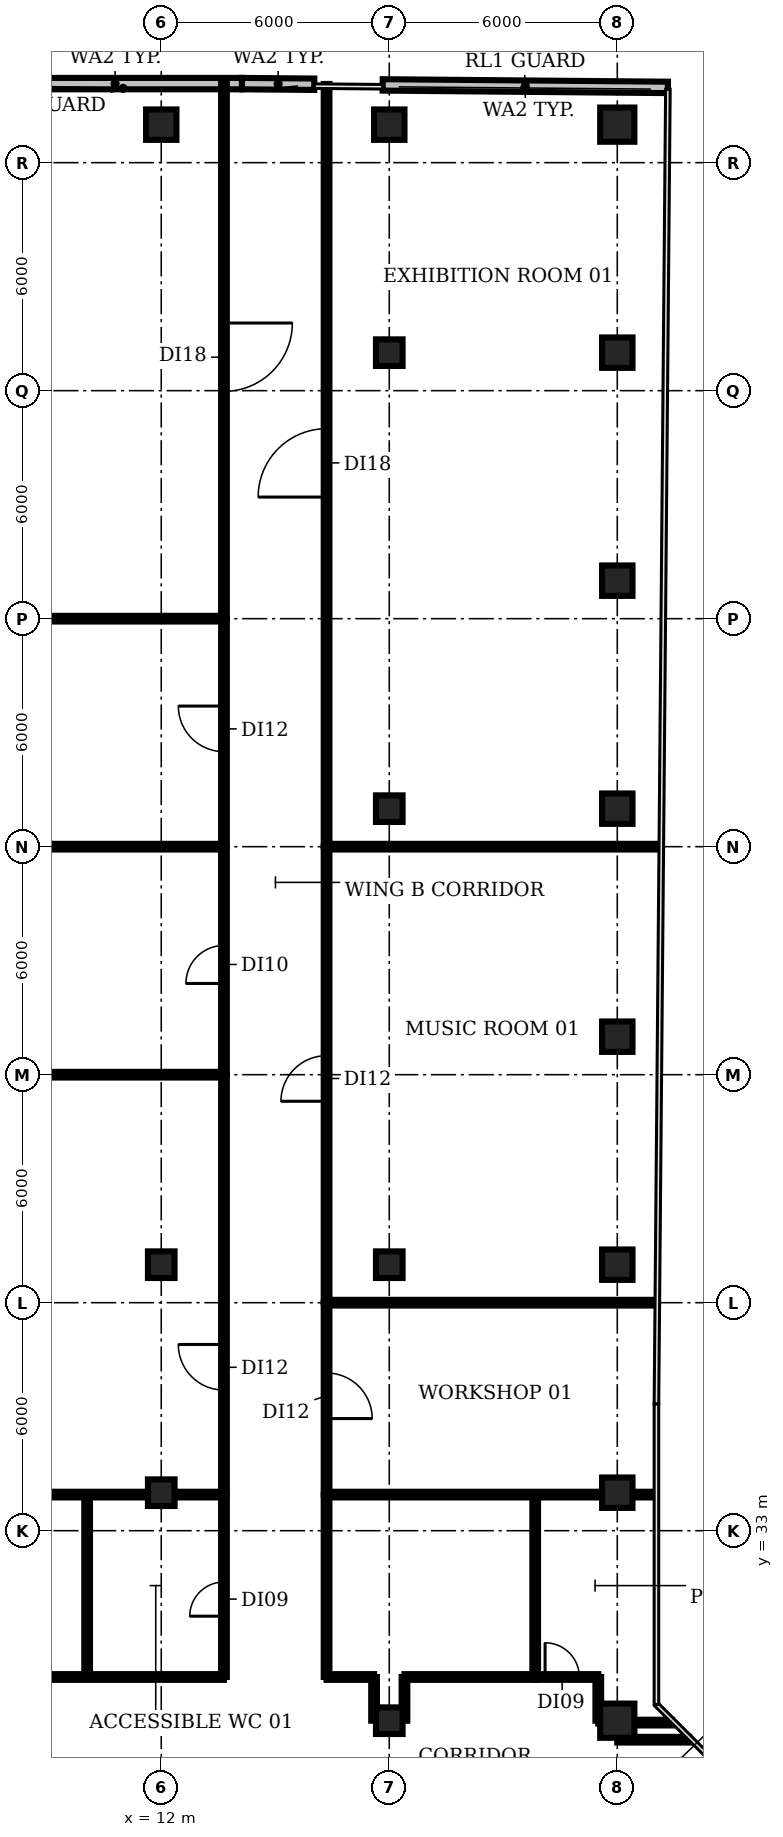
"""IFC4 building model, lengths in metres.
Left out: names, types, materials, properties, quantities, classifications, styles, units other than length and angle.
Written with IfcOpenShell. Run it as: python <this file> out.ifc"""

import sys

from ifc_helpers import new_model, si_unit, direction, frame, frame_2d, origin, origin_2d, place, context, subcontext, project, spatial, rectangle, circle, extrude, element, fill, save


model = new_model("IFC4")
c1 = context("Model", 3, precision=1e-05, world=origin(), true_north=direction((0.0, 1.0)))
c2 = subcontext(c1, "Body", "Model", "MODEL_VIEW")
j1 = project(units=[si_unit("LENGTHUNIT", "METRE"), si_unit("PLANEANGLEUNIT", "RADIAN")], contexts=[c1])
p1 = place(None, origin())
s1 = spatial("IfcSite", under=j1, at=p1, CompositionType="ELEMENT")
p2 = place(p1, origin())
s2 = spatial("IfcBuilding", under=s1, at=p2, CompositionType="ELEMENT")
p3 = place(p2, frame((0.0, 0.0, 230.6)))
s3 = spatial("IfcBuildingStorey", under=s2, at=p3, CompositionType="ELEMENT", Elevation=230.6)
for number, where, z_axis, x_axis in (
    (1, (12.0, 34.0, 0.0), (0.0, 0.0, 1.0), (1.0, 0.0, 0.0)),
    (2, (12.0, 40.0, 0.0), (0.0, 0.0, 1.0), (1.0, 0.0, 0.0)),
):
    element("IfcColumn", number, at=place(p3, frame(where, z_axis=z_axis, x_axis=x_axis)), inside=s3, PredefinedType="COLUMN", context=c2, shape_type="SweptSolid", body=[
        extrude(rectangle(XDim=0.7, YDim=0.7, at=origin_2d()), origin(), (0.0, 0.0, 1.0), 3.85),
    ])
p4 = place(p3, frame((12.0, 70.0, 0.0), z_axis=(0.0, 0.0, 1.0), x_axis=(1.0, 0.0, 0.0)))
e3 = element("IfcColumn", 3, at=p4, inside=s3, PredefinedType="COLUMN", context=c2, shape_type="SweptSolid", body=[
    extrude(rectangle(XDim=0.8, YDim=0.8, at=origin_2d()), origin(), (0.0, 0.0, 1.0), 3.85),
])
for number, where, z_axis, x_axis in (
    (4, (18.0, 28.0, 0.0), (0.0, 0.0, 1.0), (1.0, 0.0, 0.0)),
    (5, (18.0, 40.0, 0.0), (0.0, 0.0, 1.0), (1.0, 0.0, 0.0)),
    (6, (18.0, 52.0, 0.0), (0.0, 0.0, 1.0), (1.0, 0.0, 0.0)),
    (7, (18.0, 64.0, 0.0), (0.0, 0.0, 1.0), (1.0, 0.0, 0.0)),
):
    element("IfcColumn", number, at=place(p3, frame(where, z_axis=z_axis, x_axis=x_axis)), inside=s3, PredefinedType="COLUMN", context=c2, shape_type="SweptSolid", body=[
        extrude(rectangle(XDim=0.7, YDim=0.7, at=origin_2d()), origin(), (0.0, 0.0, 1.0), 3.85),
    ])
p5 = place(p3, frame((18.0, 70.0, 0.0), z_axis=(0.0, 0.0, 1.0), x_axis=(1.0, 0.0, 0.0)))
e8 = element("IfcColumn", 8, at=p5, inside=s3, PredefinedType="COLUMN", context=c2, shape_type="SweptSolid", body=[
    extrude(rectangle(XDim=0.8, YDim=0.8, at=origin_2d()), origin(), (0.0, 0.0, 1.0), 3.85),
])
p6 = place(p3, frame((24.0, 28.0, 0.0), z_axis=(0.0, 0.0, 1.0), x_axis=(1.0, 0.0, 0.0)))
e9 = element("IfcColumn", 9, at=p6, inside=s3, PredefinedType="COLUMN", context=c2, shape_type="SweptSolid", body=[
    extrude(circle(Radius=0.45, at=origin_2d()), origin(), (0.0, 0.0, 1.0), 3.85),
])
for number, where, z_axis, x_axis in (
    (10, (24.0, 34.0, 0.0), (0.0, 0.0, 1.0), (1.0, 0.0, 0.0)),
    (11, (24.0, 40.0, 0.0), (0.0, 0.0, 1.0), (1.0, 0.0, 0.0)),
    (12, (24.0, 46.0, 0.0), (0.0, 0.0, 1.0), (1.0, 0.0, 0.0)),
    (13, (24.0, 52.0, 0.0), (0.0, 0.0, 1.0), (1.0, 0.0, 0.0)),
    (14, (24.0, 58.0, 0.0), (0.0, 0.0, 1.0), (1.0, 0.0, 0.0)),
    (15, (24.0, 64.0, 0.0), (0.0, 0.0, 1.0), (1.0, 0.0, 0.0)),
):
    element("IfcColumn", number, at=place(p3, frame(where, z_axis=z_axis, x_axis=x_axis)), inside=s3, PredefinedType="COLUMN", context=c2, shape_type="SweptSolid", body=[
        extrude(rectangle(XDim=0.8, YDim=0.8, at=origin_2d()), origin(), (0.0, 0.0, 1.0), 3.85),
    ])
p7 = place(p3, frame((24.0, 70.0, 0.0), z_axis=(0.0, 0.0, 1.0), x_axis=(1.0, 0.0, 0.0)))
e16 = element("IfcColumn", 16, at=p7, inside=s3, PredefinedType="COLUMN", context=c2, shape_type="SweptSolid", body=[
    extrude(circle(Radius=0.45, at=origin_2d()), origin(), (0.0, 0.0, 1.0), 3.85),
])
p8 = place(p3, frame((14.124, 71.08, 0.0), z_axis=(0.0, 0.0, 1.0), x_axis=(-1.0, 0.0, 0.0)))
e17 = element("IfcWall", 17, at=p8, inside=s3, PredefinedType="SOLIDWALL", context=c2, shape_type="SweptSolid", body=[
    extrude(rectangle(XDim=6.677, YDim=0.3, at=frame_2d((3.339, 0.0))), origin(), (0.0, 0.0, 1.0), 3.85),
])
p9 = place(p3, frame((25.332, 70.98, 0.0), z_axis=(0.0, 0.0, 1.0), x_axis=(-0.999961723794, 0.008749339829, 0.0)))
e18 = element("IfcWall", 18, at=p9, inside=s3, PredefinedType="SOLIDWALL", context=c2, shape_type="SweptSolid", body=[
    extrude(rectangle(XDim=7.506, YDim=0.3, at=frame_2d((3.753, 0.0))), origin(), (0.0, 0.0, 1.0), 3.85),
])
p10 = place(p3, frame((16.027, 71.063, 0.0), z_axis=(0.0, 0.0, 1.0), x_axis=(-0.999961913014, 0.008727687086, 0.0)))
e19 = element("IfcWall", 19, at=p10, inside=s3, PredefinedType="SOLIDWALL", context=c2, shape_type="SweptSolid", body=[
    extrude(rectangle(XDim=1.902, YDim=0.3, at=frame_2d((0.951, 0.0))), origin(), (0.0, 0.0, 1.0), 3.85),
])
p11 = place(p3, frame((-1.0, 33.95, 0.0), z_axis=(0.0, 0.0, 1.0), x_axis=(1.0, 0.0, 0.0)))
e20 = element("IfcWall", 20, at=p11, inside=s3, PredefinedType="PARTITIONING", context=c2, shape_type="SweptSolid", body=[
    extrude(rectangle(XDim=14.65, YDim=0.15, at=frame_2d((7.325, 0.0))), origin(), (0.0, 0.0, 1.0), 2.88),
])
for number, where, z_axis, x_axis in (
    (21, (-0.98, 45.0, 0.0), (0.0, 0.0, 1.0), (1.0, 0.0, 0.0)),
    (22, (-0.98, 51.0, 0.0), (0.0, 0.0, 1.0), (1.0, 0.0, 0.0)),
    (23, (-0.98, 57.0, 0.0), (0.0, 0.0, 1.0), (1.0, 0.0, 0.0)),
):
    element("IfcWall", number, at=place(p3, frame(where, z_axis=z_axis, x_axis=x_axis)), inside=s3, PredefinedType="PARTITIONING", context=c2, shape_type="SweptSolid", body=[
        extrude(rectangle(XDim=14.63, YDim=0.15, at=frame_2d((7.315, 0.0))), origin(), (0.0, 0.0, 1.0), 2.88),
    ])
p12 = place(p3, frame((6.4, 29.15, 0.0), z_axis=(0.0, 0.0, 1.0), x_axis=(1.0, 0.0, 0.0)))
e24 = element("IfcWall", 24, at=p12, inside=s3, PredefinedType="PARTITIONING", context=c2, shape_type="SweptSolid", body=[
    extrude(rectangle(XDim=7.25, YDim=0.15, at=frame_2d((3.625, 0.0))), origin(), (0.0, 0.0, 1.0), 2.88),
])
p13 = place(p3, frame((10.05, 29.15, 0.0), z_axis=(0.0, 0.0, 1.0), x_axis=(0.0, 1.0, 0.0)))
e25 = element("IfcWall", 25, at=p13, inside=s3, PredefinedType="PARTITIONING", context=c2, shape_type="SweptSolid", body=[
    extrude(rectangle(XDim=4.8, YDim=0.15, at=frame_2d((2.4, 0.0))), origin(), (0.0, 0.0, 1.0), 2.88),
])
p14 = place(p3, frame((13.65, 29.15, 0.0), z_axis=(0.0, 0.0, 1.0), x_axis=(0.0, 1.0, 0.0)))
e26 = element("IfcWall", 26, at=p14, inside=s3, PredefinedType="PARTITIONING", context=c2, shape_type="SweptSolid", body=[
    extrude(rectangle(XDim=4.8, YDim=0.15, at=frame_2d((2.4, 0.0))), origin(), (0.0, 0.0, 1.0), 2.88),
])
p15 = place(p14, frame((1.6, 0.0, 0.0)))
e27 = element("IfcOpeningElement", 27, at=p15, cuts=e26, PredefinedType="OPENING", context=c2, shape_type="SweptSolid", body=[
    extrude(rectangle(XDim=0.9, YDim=2.1, at=frame_2d((0.45, 1.05))), frame((0.0, 0.085, 0.0), z_axis=(0.0, -1.0, 0.0), x_axis=(1.0, 0.0, 0.0)), (0.0, 0.0, 1.0), 0.17),
])
p16 = place(p3, frame((13.65, 33.95, 0.0), z_axis=(0.0, 0.0, 1.0), x_axis=(0.0, 1.0, 0.0)))
e28 = element("IfcWall", 28, at=p16, inside=s3, PredefinedType="PARTITIONING", context=c2, shape_type="SweptSolid", body=[
    extrude(rectangle(XDim=11.05, YDim=0.15, at=frame_2d((5.525, 0.0))), origin(), (0.0, 0.0, 1.0), 2.88),
])
p17 = place(p16, frame((2.75, 0.0, 0.0)))
e29 = element("IfcOpeningElement", 29, at=p17, cuts=e28, PredefinedType="OPENING", context=c2, shape_type="SweptSolid", body=[
    extrude(rectangle(XDim=1.2, YDim=2.1, at=frame_2d((0.6, 1.05))), frame((0.0, 0.085, 0.0), z_axis=(0.0, -1.0, 0.0), x_axis=(1.0, 0.0, 0.0)), (0.0, 0.0, 1.0), 0.17),
])
p18 = place(p3, frame((13.65, 45.0, 0.0), z_axis=(0.0, 0.0, 1.0), x_axis=(0.0, 1.0, 0.0)))
e30 = element("IfcWall", 30, at=p18, inside=s3, PredefinedType="PARTITIONING", context=c2, shape_type="SweptSolid", body=[
    extrude(rectangle(XDim=6.0, YDim=0.15, at=frame_2d((3.0, 0.0))), origin(), (0.0, 0.0, 1.0), 2.88),
])
p19 = place(p18, frame((2.4, 0.0, 0.0)))
e31 = element("IfcOpeningElement", 31, at=p19, cuts=e30, PredefinedType="OPENING", context=c2, shape_type="SweptSolid", body=[
    extrude(rectangle(XDim=1.0, YDim=2.1, at=frame_2d((0.5, 1.05))), frame((0.0, 0.085, 0.0), z_axis=(0.0, -1.0, 0.0), x_axis=(1.0, 0.0, 0.0)), (0.0, 0.0, 1.0), 0.17),
])
p20 = place(p3, frame((13.65, 51.0, 0.0), z_axis=(0.0, 0.0, 1.0), x_axis=(0.0, 1.0, 0.0)))
e32 = element("IfcWall", 32, at=p20, inside=s3, PredefinedType="PARTITIONING", context=c2, shape_type="SweptSolid", body=[
    extrude(rectangle(XDim=6.0, YDim=0.15, at=frame_2d((3.0, 0.0))), origin(), (0.0, 0.0, 1.0), 2.88),
])
p21 = place(p20, frame((2.5, 0.0, 0.0)))
e33 = element("IfcOpeningElement", 33, at=p21, cuts=e32, PredefinedType="OPENING", context=c2, shape_type="SweptSolid", body=[
    extrude(rectangle(XDim=1.2, YDim=2.1, at=frame_2d((0.6, 1.05))), frame((0.0, 0.085, 0.0), z_axis=(0.0, -1.0, 0.0), x_axis=(1.0, 0.0, 0.0)), (0.0, 0.0, 1.0), 0.17),
])
p22 = place(p3, frame((13.65, 71.09, 0.0), z_axis=(0.0, 0.0, 1.0), x_axis=(0.0, -1.0, 0.0)))
e34 = element("IfcWall", 34, at=p22, inside=s3, PredefinedType="PARTITIONING", context=c2, shape_type="SweptSolid", body=[
    extrude(rectangle(XDim=14.09, YDim=0.15, at=frame_2d((7.045, 0.0))), origin(), (0.0, 0.0, 1.0), 2.88),
])
p23 = place(p22, frame((6.31, 0.0, 0.0)))
e35 = element("IfcOpeningElement", 35, at=p23, cuts=e34, PredefinedType="OPENING", context=c2, shape_type="SweptSolid", body=[
    extrude(rectangle(XDim=1.8, YDim=2.1, at=frame_2d((0.9, 1.05))), frame((0.0, 0.085, 0.0), z_axis=(0.0, -1.0, 0.0), x_axis=(1.0, 0.0, 0.0)), (0.0, 0.0, 1.0), 0.17),
])
p24 = place(p3, frame((16.35, 29.15, 0.0), z_axis=(0.0, 0.0, 1.0), x_axis=(0.0, 1.0, 0.0)))
e36 = element("IfcWall", 36, at=p24, inside=s3, PredefinedType="PARTITIONING", context=c2, shape_type="SweptSolid", body=[
    extrude(rectangle(XDim=4.8, YDim=0.15, at=frame_2d((2.4, 0.0))), origin(), (0.0, 0.0, 1.0), 2.88),
])
p25 = place(p3, frame((16.35, 29.15, 0.0), z_axis=(0.0, 0.0, 1.0), x_axis=(1.0, 0.0, 0.0)))
e37 = element("IfcWall", 37, at=p25, inside=s3, PredefinedType="PARTITIONING", context=c2, shape_type="SweptSolid", body=[
    extrude(rectangle(XDim=1.25, YDim=0.15, at=frame_2d((0.625, 0.0))), origin(), (0.0, 0.0, 1.0), 2.88),
])
p26 = place(p3, frame((16.35, 33.95, 0.0), z_axis=(0.0, 0.0, 1.0), x_axis=(1.0, 0.0, 0.0)))
e38 = element("IfcWall", 38, at=p26, inside=s3, PredefinedType="PARTITIONING", context=c2, shape_type="SweptSolid", body=[
    extrude(rectangle(XDim=8.63, YDim=0.15, at=frame_2d((4.315, 0.0))), origin(), (0.0, 0.0, 1.0), 2.88),
])
p27 = place(p3, frame((16.35, 39.0, 0.0), z_axis=(0.0, 0.0, 1.0), x_axis=(0.0, -1.0, 0.0)))
e39 = element("IfcWall", 39, at=p27, inside=s3, PredefinedType="PARTITIONING", context=c2, shape_type="SweptSolid", body=[
    extrude(rectangle(XDim=5.05, YDim=0.15, at=frame_2d((2.525, 0.0))), origin(), (0.0, 0.0, 1.0), 2.88),
])
p28 = place(p27, frame((1.85, 0.0, 0.0)))
e40 = element("IfcOpeningElement", 40, at=p28, cuts=e39, PredefinedType="OPENING", context=c2, shape_type="SweptSolid", body=[
    extrude(rectangle(XDim=1.2, YDim=2.1, at=frame_2d((0.6, 1.05))), frame((0.0, 0.085, 0.0), z_axis=(0.0, -1.0, 0.0), x_axis=(1.0, 0.0, 0.0)), (0.0, 0.0, 1.0), 0.17),
])
p29 = place(p3, frame((16.35, 39.0, 0.0), z_axis=(0.0, 0.0, 1.0), x_axis=(0.0, 1.0, 0.0)))
e41 = element("IfcWall", 41, at=p29, inside=s3, PredefinedType="PARTITIONING", context=c2, shape_type="SweptSolid", body=[
    extrude(rectangle(XDim=12.0, YDim=0.15, at=frame_2d((6.0, 0.0))), origin(), (0.0, 0.0, 1.0), 2.88),
])
p30 = place(p29, frame((5.3, 0.0, 0.0)))
e42 = element("IfcOpeningElement", 42, at=p30, cuts=e41, PredefinedType="OPENING", context=c2, shape_type="SweptSolid", body=[
    extrude(rectangle(XDim=1.2, YDim=2.1, at=frame_2d((0.6, 1.05))), frame((0.0, 0.085, 0.0), z_axis=(0.0, -1.0, 0.0), x_axis=(1.0, 0.0, 0.0)), (0.0, 0.0, 1.0), 0.17),
])
p31 = place(p3, frame((16.35, 39.0, 0.0), z_axis=(0.0, 0.0, 1.0), x_axis=(1.0, 0.0, 0.0)))
e43 = element("IfcWall", 43, at=p31, inside=s3, PredefinedType="PARTITIONING", context=c2, shape_type="SweptSolid", body=[
    extrude(rectangle(XDim=8.65, YDim=0.15, at=frame_2d((4.325, 0.0))), origin(), (0.0, 0.0, 1.0), 2.88),
])
p32 = place(p3, frame((16.35, 51.0, 0.0), z_axis=(0.0, 0.0, 1.0), x_axis=(0.0, 1.0, 0.0)))
e44 = element("IfcWall", 44, at=p32, inside=s3, PredefinedType="PARTITIONING", context=c2, shape_type="SweptSolid", body=[
    extrude(rectangle(XDim=20.071, YDim=0.15, at=frame_2d((10.035, 0.0))), origin(), (0.0, 0.0, 1.0), 2.88),
])
p33 = place(p32, frame((9.2, 0.0, 0.0)))
e45 = element("IfcOpeningElement", 45, at=p33, cuts=e44, PredefinedType="OPENING", context=c2, shape_type="SweptSolid", body=[
    extrude(rectangle(XDim=1.8, YDim=2.1, at=frame_2d((0.9, 1.05))), frame((0.0, 0.085, 0.0), z_axis=(0.0, -1.0, 0.0), x_axis=(1.0, 0.0, 0.0)), (0.0, 0.0, 1.0), 0.17),
])
p34 = place(p3, frame((16.35, 51.0, 0.0), z_axis=(0.0, 0.0, 1.0), x_axis=(1.0, 0.0, 0.0)))
e46 = element("IfcWall", 46, at=p34, inside=s3, PredefinedType="PARTITIONING", context=c2, shape_type="SweptSolid", body=[
    extrude(rectangle(XDim=8.76, YDim=0.15, at=frame_2d((4.38, 0.0))), origin(), (0.0, 0.0, 1.0), 2.88),
])
for number, where, z_axis, x_axis in (
    (47, (17.6, 28.0, 0.0), (0.0, 0.0, 1.0), (0.0, 1.0, 0.0)),
    (48, (18.4, 28.0, 0.0), (0.0, 0.0, 1.0), (0.0, 1.0, 0.0)),
):
    element("IfcWall", number, at=place(p3, frame(where, z_axis=z_axis, x_axis=x_axis)), inside=s3, PredefinedType="PARTITIONING", context=c2, shape_type="SweptSolid", body=[
        extrude(rectangle(XDim=1.15, YDim=0.15, at=frame_2d((0.575, 0.0))), origin(), (0.0, 0.0, 1.0), 2.88),
    ])
p35 = place(p3, frame((18.4, 29.15, 0.0), z_axis=(0.0, 0.0, 1.0), x_axis=(1.0, 0.0, 0.0)))
e49 = element("IfcWall", 49, at=p35, inside=s3, PredefinedType="PARTITIONING", context=c2, shape_type="SweptSolid", body=[
    extrude(rectangle(XDim=3.44, YDim=0.15, at=frame_2d((1.72, 0.0))), origin(), (0.0, 0.0, 1.0), 2.88),
])
p36 = place(p3, frame((21.84, 29.15, 0.0), z_axis=(0.0, 0.0, 1.0), x_axis=(0.0, 1.0, 0.0)))
e50 = element("IfcWall", 50, at=p36, inside=s3, PredefinedType="PARTITIONING", context=c2, shape_type="SweptSolid", body=[
    extrude(rectangle(XDim=4.8, YDim=0.15, at=frame_2d((2.4, 0.0))), origin(), (0.0, 0.0, 1.0), 2.88),
])
p37 = place(p3, frame((21.84, 29.15, 0.0), z_axis=(0.0, 0.0, 1.0), x_axis=(1.0, 0.0, 0.0)))
e51 = element("IfcWall", 51, at=p37, inside=s3, PredefinedType="PARTITIONING", context=c2, shape_type="SweptSolid", body=[
    extrude(rectangle(XDim=1.66, YDim=0.15, at=frame_2d((0.83, 0.0))), origin(), (0.0, 0.0, 1.0), 2.88),
])
p38 = place(p37, frame((0.26, 0.0, 0.0)))
e52 = element("IfcOpeningElement", 52, at=p38, cuts=e51, PredefinedType="OPENING", context=c2, shape_type="SweptSolid", body=[
    extrude(rectangle(XDim=0.9, YDim=2.1, at=frame_2d((0.45, 1.05))), frame((0.0, 0.085, 0.0), z_axis=(0.0, -1.0, 0.0), x_axis=(1.0, 0.0, 0.0)), (0.0, 0.0, 1.0), 0.17),
])
p39 = place(p3, frame((23.5, 28.0, 0.0), z_axis=(0.0, 0.0, 1.0), x_axis=(0.0, 1.0, 0.0)))
e53 = element("IfcWall", 53, at=p39, inside=s3, PredefinedType="PARTITIONING", context=c2, shape_type="SweptSolid", body=[
    extrude(rectangle(XDim=1.15, YDim=0.15, at=frame_2d((0.575, 0.0))), origin(), (0.0, 0.0, 1.0), 2.88),
])
p40 = place(p3, frame((23.5, 28.0, 0.0), z_axis=(0.0, 0.0, 1.0), x_axis=(1.0, 0.0, 0.0)))
e54 = element("IfcWall", 54, at=p40, inside=s3, PredefinedType="PARTITIONING", context=c2, shape_type="SweptSolid", body=[
    extrude(rectangle(XDim=0.5, YDim=0.15, at=frame_2d((0.25, 0.0))), origin(), (0.0, 0.0, 1.0), 2.88),
])
p41 = place(p3, frame((24.0, 27.5, 0.0), z_axis=(0.0, 0.0, 1.0), x_axis=(1.0, 0.0, 0.0)))
e55 = element("IfcWall", 55, at=p41, inside=s3, PredefinedType="PARTITIONING", context=c2, shape_type="SweptSolid", body=[
    extrude(rectangle(XDim=1.89, YDim=0.15, at=frame_2d((0.945, 0.0))), origin(), (0.0, 0.0, 1.0), 2.88),
])
p42 = place(p3, frame((24.0, 27.95, 0.0), z_axis=(0.0, 0.0, 1.0), x_axis=(1.0, 0.0, 0.0)))
e56 = element("IfcWall", 56, at=p42, inside=s3, PredefinedType="PARTITIONING", context=c2, shape_type="SweptSolid", body=[
    extrude(rectangle(XDim=1.44, YDim=0.15, at=frame_2d((0.72, 0.0))), origin(), (0.0, 0.0, 1.0), 2.88),
])
p43 = place(p15, origin())
e57 = element("IfcDoor", 57, at=p43, inside=s3, OperationType="SINGLE_SWING_LEFT", PredefinedType="DOOR", context=c2, shape_type="SweptSolid", body=[
    extrude(rectangle(XDim=0.9, YDim=2.1, at=frame_2d((0.45, 1.05))), frame((0.0, 0.025, 0.0), z_axis=(0.0, -1.0, 0.0), x_axis=(1.0, 0.0, 0.0)), (0.0, 0.0, 1.0), 0.05),
])
fill(e27, e57)
p44 = place(p17, origin())
e58 = element("IfcDoor", 58, at=p44, inside=s3, OperationType="SINGLE_SWING_RIGHT", PredefinedType="DOOR", context=c2, shape_type="SweptSolid", body=[
    extrude(rectangle(XDim=1.2, YDim=2.1, at=frame_2d((0.6, 1.05))), frame((0.0, 0.025, 0.0), z_axis=(0.0, -1.0, 0.0), x_axis=(1.0, 0.0, 0.0)), (0.0, 0.0, 1.0), 0.05),
])
fill(e29, e58)
p45 = place(p19, origin())
e59 = element("IfcDoor", 59, at=p45, inside=s3, OperationType="SINGLE_SWING_LEFT", PredefinedType="DOOR", context=c2, shape_type="SweptSolid", body=[
    extrude(rectangle(XDim=1.0, YDim=2.1, at=frame_2d((0.5, 1.05))), frame((0.0, 0.025, 0.0), z_axis=(0.0, -1.0, 0.0), x_axis=(1.0, 0.0, 0.0)), (0.0, 0.0, 1.0), 0.05),
])
fill(e31, e59)
p46 = place(p21, origin())
e60 = element("IfcDoor", 60, at=p46, inside=s3, OperationType="SINGLE_SWING_RIGHT", PredefinedType="DOOR", context=c2, shape_type="SweptSolid", body=[
    extrude(rectangle(XDim=1.2, YDim=2.1, at=frame_2d((0.6, 1.05))), frame((0.0, 0.025, 0.0), z_axis=(0.0, -1.0, 0.0), x_axis=(1.0, 0.0, 0.0)), (0.0, 0.0, 1.0), 0.05),
])
fill(e33, e60)
p47 = place(p23, origin())
e61 = element("IfcDoor", 61, at=p47, inside=s3, OperationType="SINGLE_SWING_LEFT", PredefinedType="DOOR", context=c2, shape_type="SweptSolid", body=[
    extrude(rectangle(XDim=1.8, YDim=2.1, at=frame_2d((0.9, 1.05))), frame((0.0, 0.025, 0.0), z_axis=(0.0, -1.0, 0.0), x_axis=(1.0, 0.0, 0.0)), (0.0, 0.0, 1.0), 0.05),
])
fill(e35, e61)
p48 = place(p28, origin())
e62 = element("IfcDoor", 62, at=p48, inside=s3, OperationType="SINGLE_SWING_RIGHT", PredefinedType="DOOR", context=c2, shape_type="SweptSolid", body=[
    extrude(rectangle(XDim=1.2, YDim=2.1, at=frame_2d((0.6, 1.05))), frame((0.0, 0.025, 0.0), z_axis=(0.0, -1.0, 0.0), x_axis=(1.0, 0.0, 0.0)), (0.0, 0.0, 1.0), 0.05),
])
fill(e40, e62)
p49 = place(p30, origin())
e63 = element("IfcDoor", 63, at=p49, inside=s3, OperationType="SINGLE_SWING_LEFT", PredefinedType="DOOR", context=c2, shape_type="SweptSolid", body=[
    extrude(rectangle(XDim=1.2, YDim=2.1, at=frame_2d((0.6, 1.05))), frame((0.0, 0.025, 0.0), z_axis=(0.0, -1.0, 0.0), x_axis=(1.0, 0.0, 0.0)), (0.0, 0.0, 1.0), 0.05),
])
fill(e42, e63)
p50 = place(p33, origin())
e64 = element("IfcDoor", 64, at=p50, inside=s3, OperationType="SINGLE_SWING_LEFT", PredefinedType="DOOR", context=c2, shape_type="SweptSolid", body=[
    extrude(rectangle(XDim=1.8, YDim=2.1, at=frame_2d((0.9, 1.05))), frame((0.0, 0.025, 0.0), z_axis=(0.0, -1.0, 0.0), x_axis=(1.0, 0.0, 0.0)), (0.0, 0.0, 1.0), 0.05),
])
fill(e45, e64)
p51 = place(p38, origin())
e65 = element("IfcDoor", 65, at=p51, inside=s3, OperationType="SINGLE_SWING_LEFT", PredefinedType="DOOR", context=c2, shape_type="SweptSolid", body=[
    extrude(rectangle(XDim=0.9, YDim=2.1, at=frame_2d((0.45, 1.05))), frame((0.0, 0.025, 0.0), z_axis=(0.0, -1.0, 0.0), x_axis=(1.0, 0.0, 0.0)), (0.0, 0.0, 1.0), 0.05),
])
fill(e52, e65)
save(model, sys.argv[1])
